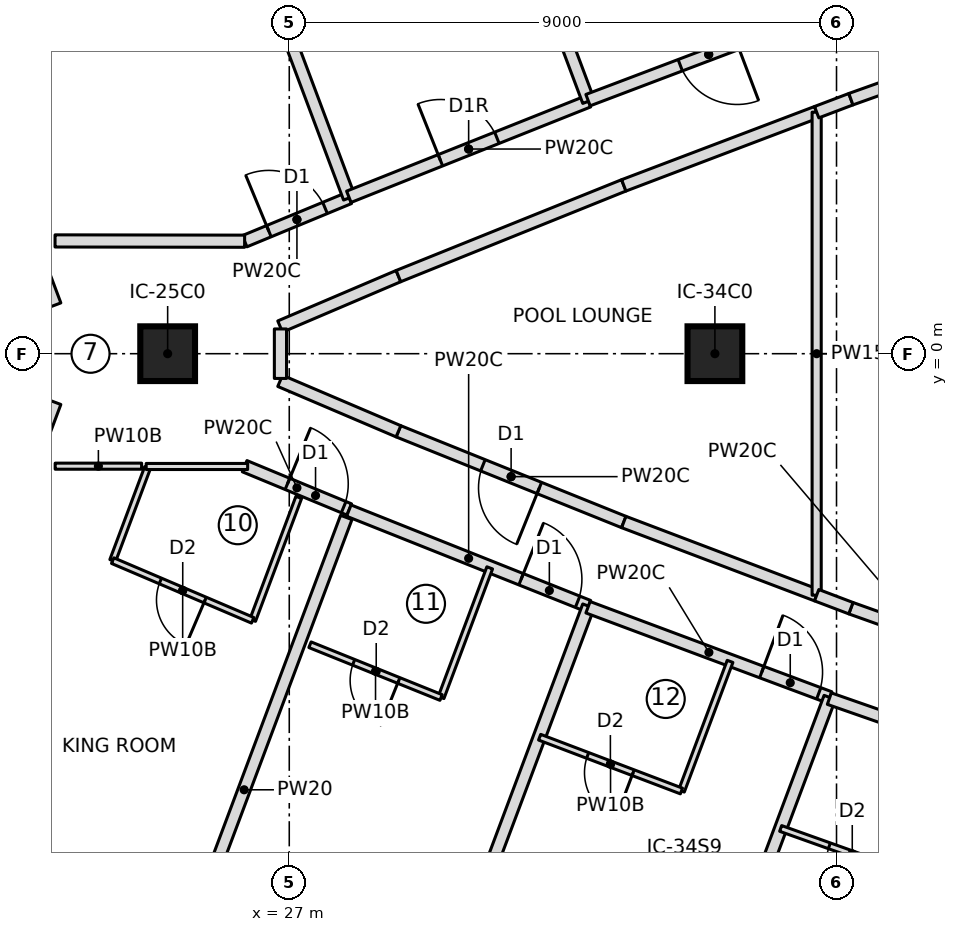
"""IFC4 building model, lengths in metres.
Left out: names, types, materials, properties, quantities, classifications, styles, units other than length and angle.
Written with IfcOpenShell. Run it as: python <this file> out.ifc"""

import sys

from ifc_helpers import new_model, si_unit, direction, frame, frame_2d, origin, origin_2d, place, context, subcontext, project, spatial, rectangle, extrude, element, fill, save


model = new_model("IFC4")
c1 = context("Model", 3, precision=1e-05, world=origin(), true_north=direction((0.0, 1.0)))
c2 = subcontext(c1, "Body", "Model", "MODEL_VIEW")
j1 = project(units=[si_unit("LENGTHUNIT", "METRE"), si_unit("PLANEANGLEUNIT", "RADIAN")], contexts=[c1])
p1 = place(None, origin())
s1 = spatial("IfcSite", under=j1, at=p1, CompositionType="ELEMENT")
p2 = place(p1, origin())
s2 = spatial("IfcBuilding", under=s1, at=p2, CompositionType="ELEMENT")
p3 = place(p2, frame((0.0, 0.0, 245.65)))
s3 = spatial("IfcBuildingStorey", under=s2, at=p3, CompositionType="ELEMENT", Elevation=245.65)
for number, where, z_axis, x_axis in (
    (1, (25.0, 0.0, 0.0), (0.0, 0.0, 1.0), (1.0, 0.0, 0.0)),
    (2, (34.0, 0.0, 0.0), (0.0, 0.0, 1.0), (1.0, 0.0, 0.0)),
):
    element("IfcColumn", number, at=place(p3, frame(where, z_axis=z_axis, x_axis=x_axis)), inside=s3, PredefinedType="COLUMN", context=c2, shape_type="SweptSolid", body=[
        extrude(rectangle(XDim=0.9, YDim=0.9, at=origin_2d()), origin(), (0.0, 0.0, 1.0), 3.55),
    ])
p4 = place(p3, frame((23.15, 0.8, 0.0), z_axis=(0.0, 0.0, 1.0), x_axis=(-0.351123441588, 0.936329177569, 0.0)))
e3 = element("IfcWall", 3, at=p4, inside=s3, PredefinedType="PARTITIONING", context=c2, shape_type="SweptSolid", body=[
    extrude(rectangle(XDim=9.416, YDim=0.2, at=frame_2d((4.708, 0.0))), origin(), (0.0, 0.0, 1.0), 3.25),
])
p5 = place(p3, frame((26.266, 1.85, 0.0), z_axis=(0.0, 0.0, 1.0), x_axis=(0.924055156704, 0.382259162569, 0.0)))
e4 = element("IfcWall", 4, at=p5, inside=s3, PredefinedType="PARTITIONING", context=c2, shape_type="SweptSolid", body=[
    extrude(rectangle(XDim=1.862, YDim=0.2, at=frame_2d((0.931, 0.0))), origin(), (0.0, 0.0, 1.0), 3.25),
])
p6 = place(p5, frame((0.431, 0.0, 0.0)))
e5 = element("IfcOpeningElement", 5, at=p6, cuts=e4, PredefinedType="OPENING", context=c2, shape_type="SweptSolid", body=[
    extrude(rectangle(XDim=1.0, YDim=2.1, at=frame_2d((0.5, 1.05))), frame((0.0, 0.11, 0.0), z_axis=(0.0, -1.0, 0.0), x_axis=(1.0, 0.0, 0.0)), (0.0, 0.0, 1.0), 0.22),
])
p7 = place(p3, frame((27.987, 2.562, 0.0), z_axis=(0.0, 0.0, 1.0), x_axis=(-0.351153757858, 0.936317808408, 0.0)))
e6 = element("IfcWall", 6, at=p7, inside=s3, PredefinedType="PARTITIONING", context=c2, shape_type="SweptSolid", body=[
    extrude(rectangle(XDim=9.708, YDim=0.2, at=frame_2d((4.854, 0.0))), origin(), (0.0, 0.0, 1.0), 3.25),
])
p8 = place(p3, frame((27.98, 2.581, 0.0), z_axis=(0.0, 0.0, 1.0), x_axis=(0.928920552813, 0.370279092795, 0.0)))
e7 = element("IfcWall", 7, at=p8, inside=s3, PredefinedType="PARTITIONING", context=c2, shape_type="SweptSolid", body=[
    extrude(rectangle(XDim=4.242, YDim=0.2, at=frame_2d((2.121, 0.0))), origin(), (0.0, 0.0, 1.0), 3.25),
])
p9 = place(p8, frame((1.621, 0.0, 0.0)))
e8 = element("IfcOpeningElement", 8, at=p9, cuts=e7, PredefinedType="OPENING", context=c2, shape_type="SweptSolid", body=[
    extrude(rectangle(XDim=1.0, YDim=2.1, at=frame_2d((0.5, 1.05))), frame((0.0, 0.11, 0.0), z_axis=(0.0, -1.0, 0.0), x_axis=(1.0, 0.0, 0.0)), (0.0, 0.0, 1.0), 0.22),
])
p10 = place(p3, frame((31.92, 4.151, 0.0), z_axis=(0.0, 0.0, 1.0), x_axis=(-0.351126199585, 0.936328143316, 0.0)))
e9 = element("IfcWall", 9, at=p10, inside=s3, PredefinedType="PARTITIONING", context=c2, shape_type="SweptSolid", body=[
    extrude(rectangle(XDim=9.701, YDim=0.2, at=frame_2d((4.851, 0.0))), origin(), (0.0, 0.0, 1.0), 3.25),
])
p11 = place(p3, frame((35.882, 5.673, 0.0), z_axis=(0.0, 0.0, 1.0), x_axis=(-0.935189471058, -0.354147784438, 0.0)))
e10 = element("IfcWall", 10, at=p11, inside=s3, PredefinedType="PARTITIONING", context=c2, shape_type="SweptSolid", body=[
    extrude(rectangle(XDim=4.244, YDim=0.2, at=frame_2d((2.122, 0.0))), origin(), (0.0, 0.0, 1.0), 3.25),
])
p12 = place(p11, frame((1.622, 0.0, 0.0)))
e11 = element("IfcOpeningElement", 11, at=p12, cuts=e10, PredefinedType="OPENING", context=c2, shape_type="SweptSolid", body=[
    extrude(rectangle(XDim=1.0, YDim=2.1, at=frame_2d((0.5, 1.05))), frame((0.0, 0.11, 0.0), z_axis=(0.0, -1.0, 0.0), x_axis=(1.0, 0.0, 0.0)), (0.0, 0.0, 1.0), 0.22),
])
p13 = place(p3, frame((19.844, -9.616, 0.0), z_axis=(0.0, 0.0, 1.0), x_axis=(0.351123441588, 0.936329177569, 0.0)))
e12 = element("IfcWall", 12, at=p13, inside=s3, PredefinedType="PARTITIONING", context=c2, shape_type="SweptSolid", body=[
    extrude(rectangle(XDim=9.416, YDim=0.2, at=frame_2d((4.708, 0.0))), origin(), (0.0, 0.0, 1.0), 3.25),
])
p14 = place(p3, frame((26.266, -1.85, 0.0), z_axis=(0.0, 0.0, 1.0), x_axis=(0.924055156704, -0.382259162569, 0.0)))
e13 = element("IfcWall", 13, at=p14, inside=s3, PredefinedType="PARTITIONING", context=c2, shape_type="SweptSolid", body=[
    extrude(rectangle(XDim=1.862, YDim=0.2, at=frame_2d((0.931, 0.0))), origin(), (0.0, 0.0, 1.0), 3.25),
])
p15 = place(p14, frame((0.762, 0.0, 0.0)))
e14 = element("IfcOpeningElement", 14, at=p15, cuts=e13, PredefinedType="OPENING", context=c2, shape_type="SweptSolid", body=[
    extrude(rectangle(XDim=1.0, YDim=2.1, at=frame_2d((0.5, 1.05))), frame((0.0, 0.11, 0.0), z_axis=(0.0, -1.0, 0.0), x_axis=(1.0, 0.0, 0.0)), (0.0, 0.0, 1.0), 0.22),
])
p16 = place(p3, frame((24.096, -3.404, 0.0), z_axis=(0.0, 0.0, 1.0), x_axis=(0.351156192753, 0.936316895229, 0.0)))
e15 = element("IfcWall", 15, at=p16, inside=s3, PredefinedType="PARTITIONING", context=c2, shape_type="SweptSolid", body=[
    extrude(rectangle(XDim=1.634, YDim=0.1, at=frame_2d((0.817, 0.0))), origin(), (0.0, 0.0, 1.0), 3.25),
])
p17 = place(p3, frame((27.156, -2.363, 0.0), z_axis=(0.0, 0.0, 1.0), x_axis=(-0.351086267198, -0.936343117124, 0.0)))
e16 = element("IfcWall", 16, at=p17, inside=s3, PredefinedType="PARTITIONING", context=c2, shape_type="SweptSolid", body=[
    extrude(rectangle(XDim=2.159, YDim=0.1, at=frame_2d((1.08, 0.0))), origin(), (0.0, 0.0, 1.0), 3.25),
])
p18 = place(p3, frame((26.398, -4.385, 0.0), z_axis=(0.0, 0.0, 1.0), x_axis=(-0.919870178563, 0.392222965404, 0.0)))
e17 = element("IfcWall", 17, at=p18, inside=s3, PredefinedType="PARTITIONING", context=c2, shape_type="SweptSolid", body=[
    extrude(rectangle(XDim=2.502, YDim=0.1, at=frame_2d((1.251, 0.0))), origin(), (0.0, 0.0, 1.0), 3.25),
])
p19 = place(p18, frame((0.85, 0.0, 0.0)))
e18 = element("IfcOpeningElement", 18, at=p19, cuts=e17, PredefinedType="OPENING", context=c2, shape_type="SweptSolid", body=[
    extrude(rectangle(XDim=0.8, YDim=2.1, at=frame_2d((0.4, 1.05))), frame((0.0, 0.06, 0.0), z_axis=(0.0, -1.0, 0.0), x_axis=(1.0, 0.0, 0.0)), (0.0, 0.0, 1.0), 0.12),
])
p20 = place(p3, frame((24.578, -11.652, 0.0), z_axis=(0.0, 0.0, 1.0), x_axis=(0.351140219871, 0.936322885542, 0.0)))
e19 = element("IfcWall", 19, at=p20, inside=s3, PredefinedType="PARTITIONING", context=c2, shape_type="SweptSolid", body=[
    extrude(rectangle(XDim=9.568, YDim=0.2, at=frame_2d((4.784, 0.0))), origin(), (0.0, 0.0, 1.0), 3.25),
])
p21 = place(p3, frame((27.98, -2.581, 0.0), z_axis=(0.0, 0.0, 1.0), x_axis=(0.928920552813, -0.370279092795, 0.0)))
e20 = element("IfcWall", 20, at=p21, inside=s3, PredefinedType="PARTITIONING", context=c2, shape_type="SweptSolid", body=[
    extrude(rectangle(XDim=4.242, YDim=0.2, at=frame_2d((2.121, 0.0))), origin(), (0.0, 0.0, 1.0), 3.25),
])
p22 = place(p21, frame((3.05, 0.0, 0.0)))
e21 = element("IfcOpeningElement", 21, at=p22, cuts=e20, PredefinedType="OPENING", context=c2, shape_type="SweptSolid", body=[
    extrude(rectangle(XDim=1.0, YDim=2.1, at=frame_2d((0.5, 1.05))), frame((0.0, 0.11, 0.0), z_axis=(0.0, -1.0, 0.0), x_axis=(1.0, 0.0, 0.0)), (0.0, 0.0, 1.0), 0.22),
])
p23 = place(p3, frame((30.296, -3.522, 0.0), z_axis=(0.0, 0.0, 1.0), x_axis=(-0.351099944253, -0.936337988734, 0.0)))
e22 = element("IfcWall", 22, at=p23, inside=s3, PredefinedType="PARTITIONING", context=c2, shape_type="SweptSolid", body=[
    extrude(rectangle(XDim=2.277, YDim=0.1, at=frame_2d((1.139, 0.0))), origin(), (0.0, 0.0, 1.0), 3.25),
])
p24 = place(p3, frame((29.497, -5.655, 0.0), z_axis=(0.0, 0.0, 1.0), x_axis=(-0.927619412923, 0.373526739028, 0.0)))
e23 = element("IfcWall", 23, at=p24, inside=s3, PredefinedType="PARTITIONING", context=c2, shape_type="SweptSolid", body=[
    extrude(rectangle(XDim=2.324, YDim=0.1, at=frame_2d((1.162, 0.0))), origin(), (0.0, 0.0, 1.0), 3.25),
])
p25 = place(p24, frame((0.75, 0.0, 0.0)))
e24 = element("IfcOpeningElement", 24, at=p25, cuts=e23, PredefinedType="OPENING", context=c2, shape_type="SweptSolid", body=[
    extrude(rectangle(XDim=0.8, YDim=2.1, at=frame_2d((0.4, 1.05))), frame((0.0, 0.06, 0.0), z_axis=(0.0, -1.0, 0.0), x_axis=(1.0, 0.0, 0.0)), (0.0, 0.0, 1.0), 0.12),
])
p26 = place(p3, frame((28.514, -13.235, 0.0), z_axis=(0.0, 0.0, 1.0), x_axis=(0.351126199585, 0.936328143316, 0.0)))
e25 = element("IfcWall", 25, at=p26, inside=s3, PredefinedType="PARTITIONING", context=c2, shape_type="SweptSolid", body=[
    extrude(rectangle(XDim=9.701, YDim=0.2, at=frame_2d((4.851, 0.0))), origin(), (0.0, 0.0, 1.0), 3.25),
])
p27 = place(p3, frame((31.913, -4.17, 0.0), z_axis=(0.0, 0.0, 1.0), x_axis=(0.936848300955, -0.349735987565, 0.0)))
e26 = element("IfcWall", 26, at=p27, inside=s3, PredefinedType="PARTITIONING", context=c2, shape_type="SweptSolid", body=[
    extrude(rectangle(XDim=4.244, YDim=0.2, at=frame_2d((2.122, 0.0))), origin(), (0.0, 0.0, 1.0), 3.25),
])
p28 = place(p27, frame((3.05, 0.0, 0.0)))
e27 = element("IfcOpeningElement", 27, at=p28, cuts=e26, PredefinedType="OPENING", context=c2, shape_type="SweptSolid", body=[
    extrude(rectangle(XDim=1.0, YDim=2.1, at=frame_2d((0.5, 1.05))), frame((0.0, 0.11, 0.0), z_axis=(0.0, -1.0, 0.0), x_axis=(1.0, 0.0, 0.0)), (0.0, 0.0, 1.0), 0.22),
])
p29 = place(p3, frame((34.25, -5.061, 0.0), z_axis=(0.0, 0.0, 1.0), x_axis=(-0.351135191353, -0.936324771323, 0.0)))
e28 = element("IfcWall", 28, at=p29, inside=s3, PredefinedType="PARTITIONING", context=c2, shape_type="SweptSolid", body=[
    extrude(rectangle(XDim=2.277, YDim=0.1, at=frame_2d((1.139, 0.0))), origin(), (0.0, 0.0, 1.0), 3.25),
])
p30 = place(p3, frame((33.45, -7.193, 0.0), z_axis=(0.0, 0.0, 1.0), x_axis=(-0.93495051617, 0.354778145202, 0.0)))
e29 = element("IfcWall", 29, at=p30, inside=s3, PredefinedType="PARTITIONING", context=c2, shape_type="SweptSolid", body=[
    extrude(rectangle(XDim=2.495, YDim=0.1, at=frame_2d((1.247, 0.0))), origin(), (0.0, 0.0, 1.0), 3.25),
])
p31 = place(p30, frame((0.85, 0.0, 0.0)))
e30 = element("IfcOpeningElement", 30, at=p31, cuts=e29, PredefinedType="OPENING", context=c2, shape_type="SweptSolid", body=[
    extrude(rectangle(XDim=0.8, YDim=2.1, at=frame_2d((0.4, 1.05))), frame((0.0, 0.06, 0.0), z_axis=(0.0, -1.0, 0.0), x_axis=(1.0, 0.0, 0.0)), (0.0, 0.0, 1.0), 0.12),
])
p32 = place(p3, frame((32.483, -14.738, 0.0), z_axis=(0.0, 0.0, 1.0), x_axis=(0.351117925717, 0.936331246002, 0.0)))
e31 = element("IfcWall", 31, at=p32, inside=s3, PredefinedType="PARTITIONING", context=c2, shape_type="SweptSolid", body=[
    extrude(rectangle(XDim=9.701, YDim=0.2, at=frame_2d((4.851, 0.0))), origin(), (0.0, 0.0, 1.0), 3.25),
])
p33 = place(p3, frame((35.882, -5.673, 0.0), z_axis=(0.0, 0.0, 1.0), x_axis=(0.944107376821, -0.329638075823, 0.0)))
e32 = element("IfcWall", 32, at=p33, inside=s3, PredefinedType="PARTITIONING", context=c2, shape_type="SweptSolid", body=[
    extrude(rectangle(XDim=4.245, YDim=0.2, at=frame_2d((2.122, 0.0))), origin(), (0.0, 0.0, 1.0), 3.25),
])
p34 = place(p33, frame((3.05, 0.0, 0.0)))
e33 = element("IfcOpeningElement", 33, at=p34, cuts=e32, PredefinedType="OPENING", context=c2, shape_type="SweptSolid", body=[
    extrude(rectangle(XDim=1.0, YDim=2.1, at=frame_2d((0.5, 1.05))), frame((0.0, 0.11, 0.0), z_axis=(0.0, -1.0, 0.0), x_axis=(1.0, 0.0, 0.0)), (0.0, 0.0, 1.0), 0.22),
])
p35 = place(p3, frame((37.436, -8.648, 0.0), z_axis=(0.0, 0.0, 1.0), x_axis=(-0.941896455552, 0.335903359641, 0.0)))
e34 = element("IfcWall", 34, at=p35, inside=s3, PredefinedType="PARTITIONING", context=c2, shape_type="SweptSolid", body=[
    extrude(rectangle(XDim=2.5, YDim=0.1, at=frame_2d((1.25, 0.0))), origin(), (0.0, 0.0, 1.0), 3.25),
])
p36 = place(p35, frame((0.85, 0.0, 0.0)))
e35 = element("IfcOpeningElement", 35, at=p36, cuts=e34, PredefinedType="OPENING", context=c2, shape_type="SweptSolid", body=[
    extrude(rectangle(XDim=0.8, YDim=2.1, at=frame_2d((0.4, 1.05))), frame((0.0, 0.06, 0.0), z_axis=(0.0, -1.0, 0.0), x_axis=(1.0, 0.0, 0.0)), (0.0, 0.0, 1.0), 0.12),
])
p37 = place(p3, frame((36.481, -16.161, 0.0), z_axis=(0.0, 0.0, 1.0), x_axis=(0.35112895446, 0.936327110224, 0.0)))
e36 = element("IfcWall", 36, at=p37, inside=s3, PredefinedType="PARTITIONING", context=c2, shape_type="SweptSolid", body=[
    extrude(rectangle(XDim=9.706, YDim=0.2, at=frame_2d((4.853, 0.0))), origin(), (0.0, 0.0, 1.0), 3.25),
])
p38 = place(p3, frame((32.501, -2.768, 0.0), z_axis=(0.0, 0.0, 1.0), x_axis=(-0.927622894464, 0.373518092823, 0.0)))
e37 = element("IfcWall", 37, at=p38, inside=s3, PredefinedType="PARTITIONING", context=c2, shape_type="SweptSolid", body=[
    extrude(rectangle(XDim=3.995, YDim=0.2, at=frame_2d((1.998, 0.0))), origin(), (0.0, 0.0, 1.0), 3.25),
])
p39 = place(p38, frame((1.498, 0.0, 0.0)))
e38 = element("IfcOpeningElement", 38, at=p39, cuts=e37, PredefinedType="OPENING", context=c2, shape_type="SweptSolid", body=[
    extrude(rectangle(XDim=1.0, YDim=2.1, at=frame_2d((0.5, 1.05))), frame((0.0, 0.11, 0.0), z_axis=(0.0, -1.0, 0.0), x_axis=(1.0, 0.0, 0.0)), (0.0, 0.0, 1.0), 0.22),
])
for number, where, z_axis, x_axis in (
    (39, (28.796, -1.276, 0.0), (0.0, 0.0, 1.0), (-0.92, 0.392, 0.0)),
    (40, (26.85, 0.447, 0.0), (0.0, 0.0, 1.0), (0.92, 0.392, 0.0)),
):
    element("IfcWall", number, at=place(p3, frame(where, z_axis=z_axis, x_axis=x_axis)), inside=s3, PredefinedType="PARTITIONING", context=c2, shape_type="SweptSolid", body=[
        extrude(rectangle(XDim=2.115, YDim=0.2, at=frame_2d((1.058, 0.0))), origin(), (0.0, 0.0, 1.0), 3.25),
    ])
p40 = place(p3, frame((28.796, 1.276, 0.0), z_axis=(0.0, 0.0, 1.0), x_axis=(0.927622894464, 0.373518092823, 0.0)))
e41 = element("IfcWall", 41, at=p40, inside=s3, PredefinedType="PARTITIONING", context=c2, shape_type="SweptSolid", body=[
    extrude(rectangle(XDim=3.995, YDim=0.2, at=frame_2d((1.998, 0.0))), origin(), (0.0, 0.0, 1.0), 3.25),
])
for number, where, z_axis, x_axis in (
    (42, (32.501, 2.768, 0.0), (0.0, 0.0, 1.0), (0.935, 0.355, 0.0)),
    (43, (35.674, -3.972, 0.0), (0.0, 0.0, 1.0), (-0.935, 0.355, 0.0)),
):
    element("IfcWall", number, at=place(p3, frame(where, z_axis=z_axis, x_axis=x_axis)), inside=s3, PredefinedType="PARTITIONING", context=c2, shape_type="SweptSolid", body=[
        extrude(rectangle(XDim=3.393, YDim=0.2, at=frame_2d((1.696, 0.0))), origin(), (0.0, 0.0, 1.0), 3.25),
    ])
p41 = place(p3, frame((35.674, -3.972, 0.0), z_axis=(0.0, 0.0, 1.0), x_axis=(0.0, 1.0, 0.0)))
e44 = element("IfcWall", 44, at=p41, inside=s3, PredefinedType="PARTITIONING", context=c2, shape_type="SweptSolid", body=[
    extrude(rectangle(XDim=7.944, YDim=0.15, at=frame_2d((3.972, 0.0))), origin(), (0.0, 0.0, 1.0), 3.25),
])
p42 = place(p3, frame((38.674, -5.055, 0.0), z_axis=(0.0, 0.0, 1.0), x_axis=(-0.941901902054, 0.335888086879, 0.0)))
e45 = element("IfcWall", 45, at=p42, inside=s3, PredefinedType="PARTITIONING", context=c2, shape_type="SweptSolid", body=[
    extrude(rectangle(XDim=2.588, YDim=0.2, at=frame_2d((1.294, 0.0))), origin(), (0.0, 0.0, 1.0), 3.25),
])
p43 = place(p42, frame((0.794, 0.0, 0.0)))
e46 = element("IfcOpeningElement", 46, at=p43, cuts=e45, PredefinedType="OPENING", context=c2, shape_type="SweptSolid", body=[
    extrude(rectangle(XDim=1.0, YDim=2.1, at=frame_2d((0.5, 1.05))), frame((0.0, 0.11, 0.0), z_axis=(0.0, -1.0, 0.0), x_axis=(1.0, 0.0, 0.0)), (0.0, 0.0, 1.0), 0.22),
])
for number, where, z_axis, x_axis in (
    (47, (36.236, -4.186, 0.0), (0.0, 0.0, 1.0), (-0.935, 0.355, 0.0)),
    (48, (35.674, 3.972, 0.0), (0.0, 0.0, 1.0), (0.935, 0.355, 0.0)),
):
    element("IfcWall", number, at=place(p3, frame(where, z_axis=z_axis, x_axis=x_axis)), inside=s3, PredefinedType="PARTITIONING", context=c2, shape_type="SweptSolid", body=[
        extrude(rectangle(XDim=0.602, YDim=0.2, at=frame_2d((0.301, 0.0))), origin(), (0.0, 0.0, 1.0), 3.25),
    ])
p44 = place(p3, frame((36.236, 4.186, 0.0), z_axis=(0.0, 0.0, 1.0), x_axis=(0.941901902054, 0.335888086879, 0.0)))
e49 = element("IfcWall", 49, at=p44, inside=s3, PredefinedType="PARTITIONING", context=c2, shape_type="SweptSolid", body=[
    extrude(rectangle(XDim=2.588, YDim=0.2, at=frame_2d((1.294, 0.0))), origin(), (0.0, 0.0, 1.0), 3.25),
])
p45 = place(p3, frame((24.647, -1.855, 0.0), z_axis=(0.0, 0.0, 1.0), x_axis=(1.0, 0.0, 0.0)))
e50 = element("IfcWall", 50, at=p45, inside=s3, PredefinedType="PARTITIONING", context=c2, shape_type="SweptSolid", body=[
    extrude(rectangle(XDim=1.669, YDim=0.1, at=frame_2d((0.834, 0.0))), origin(), (0.0, 0.0, 1.0), 3.25),
])
p46 = place(p3, frame((26.855, -0.407, 0.0), z_axis=(0.0, 0.0, 1.0), x_axis=(0.0, 1.0, 0.0)))
e51 = element("IfcWall", 51, at=p46, inside=s3, PredefinedType="PARTITIONING", context=c2, shape_type="SweptSolid", body=[
    extrude(rectangle(XDim=0.814, YDim=0.2, at=frame_2d((0.407, 0.0))), origin(), (0.0, 0.0, 1.0), 3.25),
])
p47 = place(p3, frame((26.266, 1.85, 0.0), z_axis=(0.0, 0.0, 1.0), x_axis=(-0.999999006581, 0.001409552241, 0.0)))
e52 = element("IfcWall", 52, at=p47, inside=s3, PredefinedType="PARTITIONING", context=c2, shape_type="SweptSolid", body=[
    extrude(rectangle(XDim=3.118, YDim=0.2, at=frame_2d((1.559, 0.0))), origin(), (0.0, 0.0, 1.0), 3.25),
])
p48 = place(p3, frame((24.572, -1.85, 0.0), z_axis=(0.0, 0.0, 1.0), x_axis=(-1.0, 0.0, 0.0)))
e53 = element("IfcWall", 53, at=p48, inside=s3, PredefinedType="PARTITIONING", context=c2, shape_type="SweptSolid", body=[
    extrude(rectangle(XDim=1.422, YDim=0.1, at=frame_2d((0.711, 0.0))), origin(), (0.0, 0.0, 1.0), 3.25),
])
p49 = place(p6, origin())
e54 = element("IfcDoor", 54, at=p49, inside=s3, OperationType="SINGLE_SWING_LEFT", PredefinedType="DOOR", context=c2, shape_type="SweptSolid", body=[
    extrude(rectangle(XDim=1.0, YDim=2.1, at=frame_2d((0.5, 1.05))), frame((0.0, 0.025, 0.0), z_axis=(0.0, -1.0, 0.0), x_axis=(1.0, 0.0, 0.0)), (0.0, 0.0, 1.0), 0.05),
])
fill(e5, e54)
p50 = place(p9, origin())
e55 = element("IfcDoor", 55, at=p50, inside=s3, OperationType="SINGLE_SWING_RIGHT", PredefinedType="DOOR", context=c2, shape_type="SweptSolid", body=[
    extrude(rectangle(XDim=1.0, YDim=2.1, at=frame_2d((0.5, 1.05))), frame((0.0, 0.025, 0.0), z_axis=(0.0, -1.0, 0.0), x_axis=(1.0, 0.0, 0.0)), (0.0, 0.0, 1.0), 0.05),
])
fill(e8, e55)
p51 = place(p12, origin())
e56 = element("IfcDoor", 56, at=p51, inside=s3, OperationType="SINGLE_SWING_LEFT", PredefinedType="DOOR", context=c2, shape_type="SweptSolid", body=[
    extrude(rectangle(XDim=1.0, YDim=2.1, at=frame_2d((0.5, 1.05))), frame((0.0, 0.025, 0.0), z_axis=(0.0, -1.0, 0.0), x_axis=(1.0, 0.0, 0.0)), (0.0, 0.0, 1.0), 0.05),
])
fill(e11, e56)
p52 = place(p19, origin())
e57 = element("IfcDoor", 57, at=p52, inside=s3, OperationType="SINGLE_SWING_LEFT", PredefinedType="DOOR", context=c2, shape_type="SweptSolid", body=[
    extrude(rectangle(XDim=0.8, YDim=2.1, at=frame_2d((0.4, 1.05))), frame((0.0, 0.025, 0.0), z_axis=(0.0, -1.0, 0.0), x_axis=(1.0, 0.0, 0.0)), (0.0, 0.0, 1.0), 0.05),
])
fill(e18, e57)
p53 = place(p15, origin())
e58 = element("IfcDoor", 58, at=p53, inside=s3, OperationType="SINGLE_SWING_LEFT", PredefinedType="DOOR", context=c2, shape_type="SweptSolid", body=[
    extrude(rectangle(XDim=1.0, YDim=2.1, at=frame_2d((0.5, 1.05))), frame((0.0, 0.025, 0.0), z_axis=(0.0, -1.0, 0.0), x_axis=(1.0, 0.0, 0.0)), (0.0, 0.0, 1.0), 0.05),
])
fill(e14, e58)
p54 = place(p25, origin())
e59 = element("IfcDoor", 59, at=p54, inside=s3, OperationType="SINGLE_SWING_LEFT", PredefinedType="DOOR", context=c2, shape_type="SweptSolid", body=[
    extrude(rectangle(XDim=0.8, YDim=2.1, at=frame_2d((0.4, 1.05))), frame((0.0, 0.025, 0.0), z_axis=(0.0, -1.0, 0.0), x_axis=(1.0, 0.0, 0.0)), (0.0, 0.0, 1.0), 0.05),
])
fill(e24, e59)
p55 = place(p22, origin())
e60 = element("IfcDoor", 60, at=p55, inside=s3, OperationType="SINGLE_SWING_LEFT", PredefinedType="DOOR", context=c2, shape_type="SweptSolid", body=[
    extrude(rectangle(XDim=1.0, YDim=2.1, at=frame_2d((0.5, 1.05))), frame((0.0, 0.025, 0.0), z_axis=(0.0, -1.0, 0.0), x_axis=(1.0, 0.0, 0.0)), (0.0, 0.0, 1.0), 0.05),
])
fill(e21, e60)
p56 = place(p31, origin())
e61 = element("IfcDoor", 61, at=p56, inside=s3, OperationType="SINGLE_SWING_LEFT", PredefinedType="DOOR", context=c2, shape_type="SweptSolid", body=[
    extrude(rectangle(XDim=0.8, YDim=2.1, at=frame_2d((0.4, 1.05))), frame((0.0, 0.025, 0.0), z_axis=(0.0, -1.0, 0.0), x_axis=(1.0, 0.0, 0.0)), (0.0, 0.0, 1.0), 0.05),
])
fill(e30, e61)
p57 = place(p28, origin())
e62 = element("IfcDoor", 62, at=p57, inside=s3, OperationType="SINGLE_SWING_LEFT", PredefinedType="DOOR", context=c2, shape_type="SweptSolid", body=[
    extrude(rectangle(XDim=1.0, YDim=2.1, at=frame_2d((0.5, 1.05))), frame((0.0, 0.025, 0.0), z_axis=(0.0, -1.0, 0.0), x_axis=(1.0, 0.0, 0.0)), (0.0, 0.0, 1.0), 0.05),
])
fill(e27, e62)
p58 = place(p36, origin())
e63 = element("IfcDoor", 63, at=p58, inside=s3, OperationType="SINGLE_SWING_LEFT", PredefinedType="DOOR", context=c2, shape_type="SweptSolid", body=[
    extrude(rectangle(XDim=0.8, YDim=2.1, at=frame_2d((0.4, 1.05))), frame((0.0, 0.025, 0.0), z_axis=(0.0, -1.0, 0.0), x_axis=(1.0, 0.0, 0.0)), (0.0, 0.0, 1.0), 0.05),
])
fill(e35, e63)
p59 = place(p39, origin())
e64 = element("IfcDoor", 64, at=p59, inside=s3, OperationType="SINGLE_SWING_LEFT", PredefinedType="DOOR", context=c2, shape_type="SweptSolid", body=[
    extrude(rectangle(XDim=1.0, YDim=2.1, at=frame_2d((0.5, 1.05))), frame((0.0, 0.025, 0.0), z_axis=(0.0, -1.0, 0.0), x_axis=(1.0, 0.0, 0.0)), (0.0, 0.0, 1.0), 0.05),
])
fill(e38, e64)
save(model, sys.argv[1])
